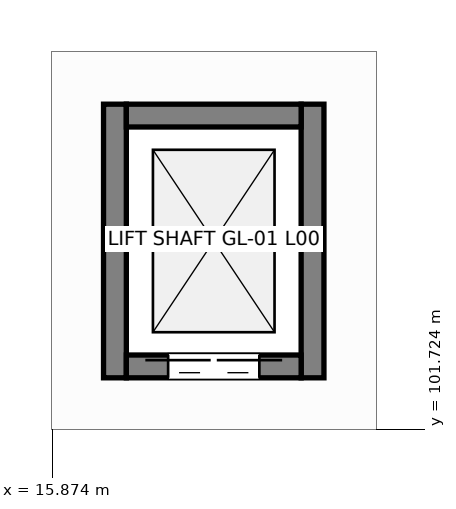
"""IFC4 building model, lengths in metres.
Left out: names, types, materials, properties, quantities, classifications, styles, units other than length and angle.
Written with IfcOpenShell. Run it as: python <this file> out.ifc"""

import sys

from ifc_helpers import new_model, si_unit, direction, frame, frame_2d, origin, place, context, subcontext, project, spatial, rectangle, extrude, element, fill, save


model = new_model("IFC4")
c1 = context("Model", 3, precision=1e-05, world=origin(), true_north=direction((0.0, 1.0)))
c2 = subcontext(c1, "Body", "Model", "MODEL_VIEW")
j1 = project(units=[si_unit("LENGTHUNIT", "METRE"), si_unit("PLANEANGLEUNIT", "RADIAN")], contexts=[c1])
p1 = place(None, origin())
s1 = spatial("IfcSite", under=j1, at=p1, CompositionType="ELEMENT")
p2 = place(p1, origin())
s2 = spatial("IfcBuilding", under=s1, at=p2, CompositionType="ELEMENT")
p3 = place(p2, origin())
s3 = spatial("IfcBuildingStorey", under=s2, at=p3, CompositionType="ELEMENT", Elevation=0.0)
for number, where, z_axis, x_axis in (
    (1, (16.7, 102.4, 0.0), (0.0, 0.0, 1.0), (0.0, 1.0, 0.0)),
    (2, (19.3, 102.4, 0.0), (0.0, 0.0, 1.0), (0.0, 1.0, 0.0)),
):
    element("IfcWall", number, at=place(p3, frame(where, z_axis=z_axis, x_axis=x_axis)), inside=s3, PredefinedType="SHEAR", context=c2, shape_type="SweptSolid", body=[
        extrude(rectangle(XDim=3.6, YDim=0.3, at=frame_2d((1.8, 0.0))), origin(), (0.0, 0.0, 1.0), 4.58),
    ])
p4 = place(p3, frame((16.85, 105.85, 0.0), z_axis=(0.0, 0.0, 1.0), x_axis=(1.0, 0.0, 0.0)))
e3 = element("IfcWall", 3, at=p4, inside=s3, PredefinedType="SHEAR", context=c2, shape_type="SweptSolid", body=[
    extrude(rectangle(XDim=2.3, YDim=0.3, at=frame_2d((1.15, 0.0))), origin(), (0.0, 0.0, 1.0), 4.58),
])
p5 = place(p3, frame((16.85, 102.55, 0.0), z_axis=(0.0, 0.0, 1.0), x_axis=(1.0, 0.0, 0.0)))
e4 = element("IfcWall", 4, at=p5, inside=s3, PredefinedType="SHEAR", context=c2, shape_type="SweptSolid", body=[
    extrude(rectangle(XDim=2.3, YDim=0.3, at=frame_2d((1.15, 0.0))), origin(), (0.0, 0.0, 1.0), 4.58),
])
p6 = place(p5, frame((0.55, 0.0, 0.0)))
e5 = element("IfcOpeningElement", 5, at=p6, cuts=e4, PredefinedType="OPENING", context=c2, shape_type="SweptSolid", body=[
    extrude(rectangle(XDim=1.2, YDim=2.15, at=frame_2d((0.6, 1.075))), frame((0.0, 0.16, 0.0), z_axis=(0.0, -1.0, 0.0), x_axis=(1.0, 0.0, 0.0)), (0.0, 0.0, 1.0), 0.32),
])
p7 = place(p6, origin())
e6 = element("IfcDoor", 6, at=p7, inside=s3, OperationType="DOUBLE_DOOR_SLIDING", PredefinedType="DOOR", context=c2, shape_type="SweptSolid", body=[
    extrude(rectangle(XDim=1.2, YDim=2.15, at=frame_2d((0.6, 1.075))), frame((0.0, 0.025, 0.0), z_axis=(0.0, -1.0, 0.0), x_axis=(1.0, 0.0, 0.0)), (0.0, 0.0, 1.0), 0.05),
])
fill(e5, e6)
save(model, sys.argv[1])
